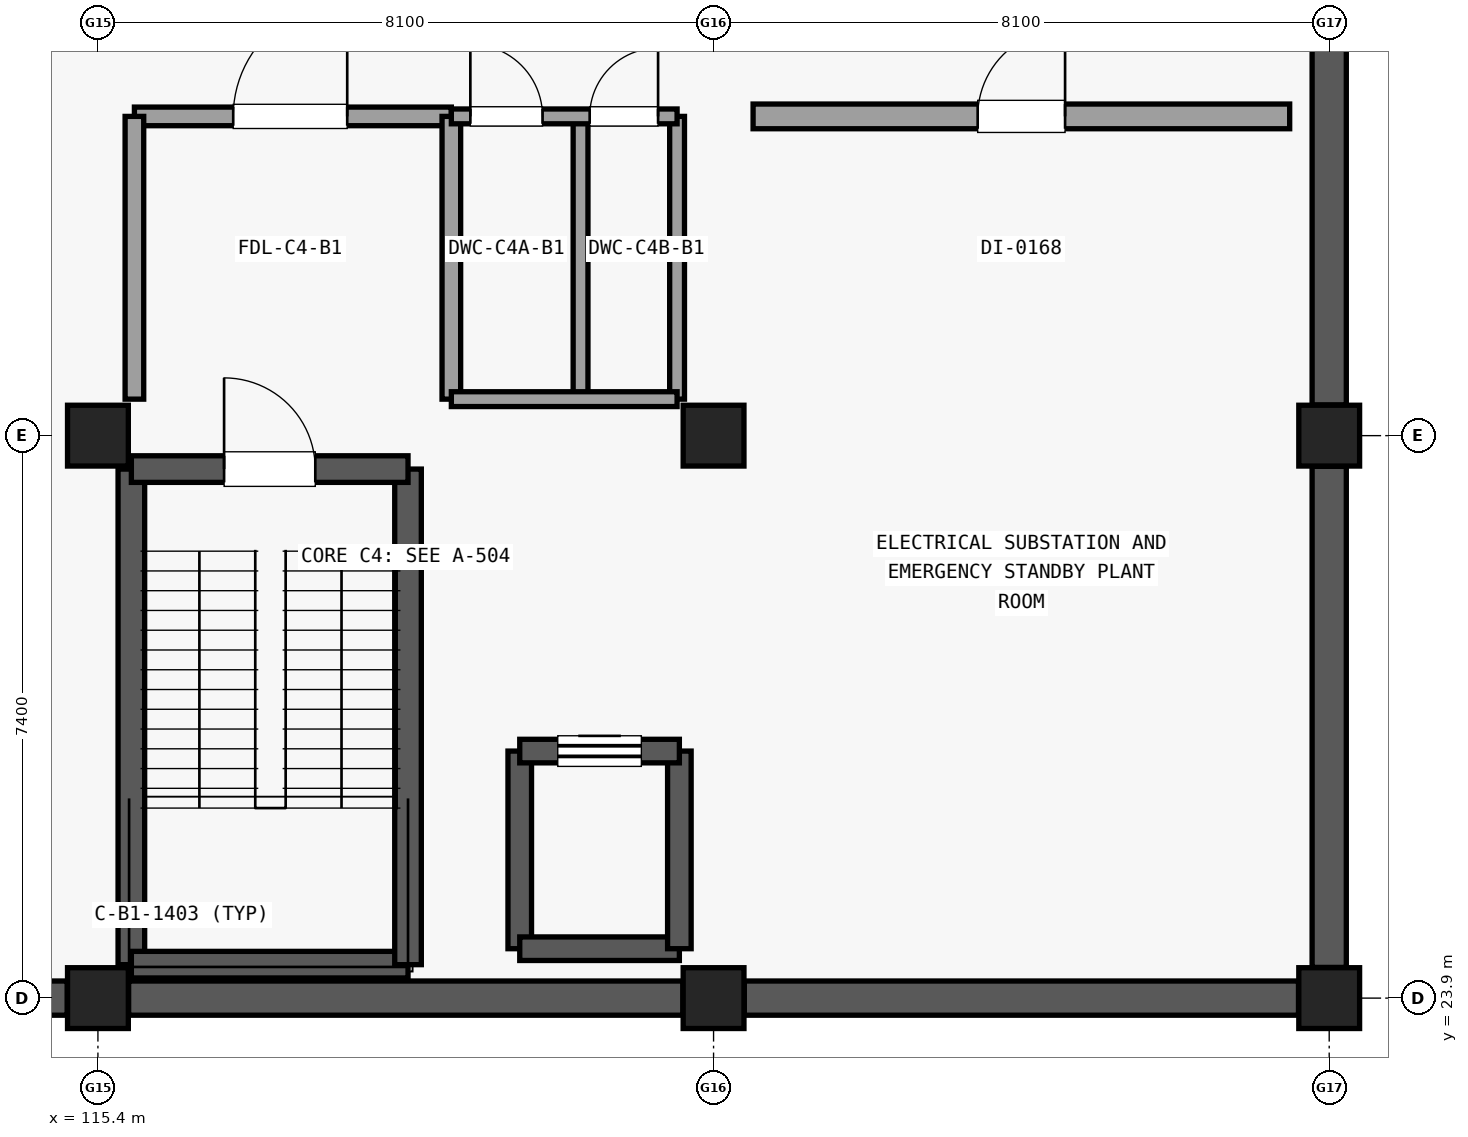
"""IFC4 building model, lengths in metres.
Left out: names, types, materials, properties, quantities, classifications, styles, units other than length and angle.
Written with IfcOpenShell. Run it as: python <this file> out.ifc"""

import sys

from ifc_helpers import new_model, si_unit, direction, frame, frame_2d, origin, origin_2d, place, context, subcontext, project, spatial, rectangle, extrude, element, fill, save


model = new_model("IFC4")
c1 = context("Model", 3, precision=1e-05, world=origin(), true_north=direction((0.0, 1.0)))
c2 = subcontext(c1, "Body", "Model", "MODEL_VIEW")
j1 = project(units=[si_unit("LENGTHUNIT", "METRE"), si_unit("PLANEANGLEUNIT", "RADIAN")], contexts=[c1])
p1 = place(None, origin())
s1 = spatial("IfcSite", under=j1, at=p1, CompositionType="ELEMENT")
p2 = place(p1, origin())
s2 = spatial("IfcBuilding", under=s1, at=p2, CompositionType="ELEMENT")
p3 = place(p2, frame((0.0, 0.0, -4.8)))
s3 = spatial("IfcBuildingStorey", under=s2, at=p3, CompositionType="ELEMENT", Elevation=-4.8)
for number, where, z_axis, x_axis in (
    (1, (115.4, 23.9, 0.0), (0.0, 0.0, 1.0), (1.0, 0.0, 0.0)),
    (2, (115.4, 31.3, 0.0), (0.0, 0.0, 1.0), (1.0, 0.0, 0.0)),
    (3, (123.5, 23.9, 0.0), (0.0, 0.0, 1.0), (1.0, 0.0, 0.0)),
    (4, (123.5, 31.3, 0.0), (0.0, 0.0, 1.0), (1.0, 0.0, 0.0)),
    (5, (131.6, 23.9, 0.0), (0.0, 0.0, 1.0), (1.0, 0.0, 0.0)),
    (6, (131.6, 31.3, 0.0), (0.0, 0.0, 1.0), (1.0, 0.0, 0.0)),
):
    element("IfcColumn", number, at=place(p3, frame(where, z_axis=z_axis, x_axis=x_axis)), inside=s3, PredefinedType="COLUMN", context=c2, shape_type="SweptSolid", body=[
        extrude(rectangle(XDim=0.8, YDim=0.8, at=origin_2d()), origin(), (0.0, 0.0, 1.0), 4.52),
    ])
for number, where, z_axis, x_axis in (
    (7, (114.996, 23.9, 0.0), (0.0, 0.0, 1.0), (-1.0, 0.0, 0.0)),
    (8, (123.096, 23.9, 0.0), (0.0, 0.0, 1.0), (-1.0, 0.0, 0.0)),
    (9, (131.196, 23.9, 0.0), (0.0, 0.0, 1.0), (-1.0, 0.0, 0.0)),
):
    element("IfcWall", number, at=place(p3, frame(where, z_axis=z_axis, x_axis=x_axis)), inside=s3, PredefinedType="USERDEFINED", context=c2, shape_type="SweptSolid", body=[
        extrude(rectangle(XDim=7.292, YDim=0.45, at=frame_2d((3.646, 0.0))), origin(), (0.0, 0.0, 1.0), 2.95),
    ])
p4 = place(p3, frame((131.6, 30.896, 0.0), z_axis=(0.0, 0.0, 1.0), x_axis=(0.0, -1.0, 0.0)))
e10 = element("IfcWall", 10, at=p4, inside=s3, PredefinedType="USERDEFINED", context=c2, shape_type="SweptSolid", body=[
    extrude(rectangle(XDim=6.592, YDim=0.45, at=frame_2d((3.296, 0.0))), origin(), (0.0, 0.0, 1.0), 2.95),
])
p5 = place(p3, frame((131.6, 38.296, 0.0), z_axis=(0.0, 0.0, 1.0), x_axis=(0.0, -1.0, 0.0)))
e11 = element("IfcWall", 11, at=p5, inside=s3, PredefinedType="USERDEFINED", context=c2, shape_type="SweptSolid", body=[
    extrude(rectangle(XDim=6.592, YDim=0.45, at=frame_2d((3.296, 0.0))), origin(), (0.0, 0.0, 1.0), 2.95),
])
p6 = place(p3, frame((115.84, 24.34, 0.0), z_axis=(0.0, 0.0, 1.0), x_axis=(0.0, 1.0, 0.0)))
e12 = element("IfcWall", 12, at=p6, inside=s3, PredefinedType="SHEAR", context=c2, shape_type="SweptSolid", body=[
    extrude(rectangle(XDim=6.52, YDim=0.35, at=frame_2d((3.26, 0.0))), origin(), (0.0, 0.0, 1.0), 4.515),
])
p7 = place(p3, frame((115.84, 24.34, 0.0), z_axis=(0.0, 0.0, 1.0), x_axis=(1.0, 0.0, 0.0)))
e13 = element("IfcWall", 13, at=p7, inside=s3, PredefinedType="SHEAR", context=c2, shape_type="SweptSolid", body=[
    extrude(rectangle(XDim=3.64, YDim=0.35, at=frame_2d((1.82, 0.0))), origin(), (0.0, 0.0, 1.0), 4.515),
])
p8 = place(p3, frame((119.48, 24.34, 0.0), z_axis=(0.0, 0.0, 1.0), x_axis=(0.0, 1.0, 0.0)))
e14 = element("IfcWall", 14, at=p8, inside=s3, PredefinedType="SHEAR", context=c2, shape_type="SweptSolid", body=[
    extrude(rectangle(XDim=6.52, YDim=0.35, at=frame_2d((3.26, 0.0))), origin(), (0.0, 0.0, 1.0), 4.515),
])
p9 = place(p3, frame((115.84, 30.86, 0.0), z_axis=(0.0, 0.0, 1.0), x_axis=(1.0, 0.0, 0.0)))
e15 = element("IfcWall", 15, at=p9, inside=s3, PredefinedType="SHEAR", context=c2, shape_type="SweptSolid", body=[
    extrude(rectangle(XDim=3.64, YDim=0.35, at=frame_2d((1.82, 0.0))), origin(), (0.0, 0.0, 1.0), 4.515),
])
p10 = place(p9, frame((1.22, 0.0, 0.0)))
e16 = element("IfcOpeningElement", 16, at=p10, cuts=e15, PredefinedType="OPENING", context=c2, shape_type="SweptSolid", body=[
    extrude(rectangle(XDim=1.2, YDim=2.15, at=frame_2d((0.6, 1.075))), frame((0.0, 0.185, 0.0), z_axis=(0.0, -1.0, 0.0), x_axis=(1.0, 0.0, 0.0)), (0.0, 0.0, 1.0), 0.37),
])
p11 = place(p3, frame((120.95, 24.55, 0.0), z_axis=(0.0, 0.0, 1.0), x_axis=(0.0, 1.0, 0.0)))
e17 = element("IfcWall", 17, at=p11, inside=s3, PredefinedType="SHEAR", context=c2, shape_type="SweptSolid", body=[
    extrude(rectangle(XDim=2.6, YDim=0.31, at=frame_2d((1.3, 0.0))), origin(), (0.0, 0.0, 1.0), 4.515),
])
p12 = place(p3, frame((120.95, 24.55, 0.0), z_axis=(0.0, 0.0, 1.0), x_axis=(1.0, 0.0, 0.0)))
e18 = element("IfcWall", 18, at=p12, inside=s3, PredefinedType="SHEAR", context=c2, shape_type="SweptSolid", body=[
    extrude(rectangle(XDim=2.1, YDim=0.31, at=frame_2d((1.05, 0.0))), origin(), (0.0, 0.0, 1.0), 4.515),
])
p13 = place(p3, frame((123.05, 24.55, 0.0), z_axis=(0.0, 0.0, 1.0), x_axis=(0.0, 1.0, 0.0)))
e19 = element("IfcWall", 19, at=p13, inside=s3, PredefinedType="SHEAR", context=c2, shape_type="SweptSolid", body=[
    extrude(rectangle(XDim=2.6, YDim=0.31, at=frame_2d((1.3, 0.0))), origin(), (0.0, 0.0, 1.0), 4.515),
])
p14 = place(p3, frame((120.95, 27.15, 0.0), z_axis=(0.0, 0.0, 1.0), x_axis=(1.0, 0.0, 0.0)))
e20 = element("IfcWall", 20, at=p14, inside=s3, PredefinedType="SHEAR", context=c2, shape_type="SweptSolid", body=[
    extrude(rectangle(XDim=2.1, YDim=0.31, at=frame_2d((1.05, 0.0))), origin(), (0.0, 0.0, 1.0), 4.515),
])
p15 = place(p14, frame((0.5, 0.0, 0.0)))
e21 = element("IfcOpeningElement", 21, at=p15, cuts=e20, PredefinedType="OPENING", context=c2, shape_type="SweptSolid", body=[
    extrude(rectangle(XDim=1.1, YDim=2.15, at=frame_2d((0.55, 1.075))), frame((0.0, 0.165, 0.0), z_axis=(0.0, -1.0, 0.0), x_axis=(1.0, 0.0, 0.0)), (0.0, 0.0, 1.0), 0.33),
])
p16 = place(p3, frame((115.88, 35.5, 0.0), z_axis=(0.0, 0.0, 1.0), x_axis=(1.0, 0.0, 0.0)))
e22 = element("IfcWall", 22, at=p16, inside=s3, PredefinedType="PARTITIONING", context=c2, shape_type="SweptSolid", body=[
    extrude(rectangle(XDim=4.17, YDim=0.245, at=frame_2d((2.085, 0.0))), origin(), (0.0, 0.0, 1.0), 3.71),
])
p17 = place(p16, frame((1.3, 0.0, 0.0)))
e23 = element("IfcOpeningElement", 23, at=p17, cuts=e22, PredefinedType="OPENING", context=c2, shape_type="SweptSolid", body=[
    extrude(rectangle(XDim=1.5, YDim=2.15, at=frame_2d((0.75, 1.075))), frame((0.0, 0.133, 0.0), z_axis=(0.0, -1.0, 0.0), x_axis=(1.0, 0.0, 0.0)), (0.0, 0.0, 1.0), 0.265),
])
for number, where, z_axis, x_axis in (
    (24, (115.88, 31.78, 0.0), (0.0, 0.0, 1.0), (0.0, 1.0, 0.0)),
    (25, (120.05, 31.78, 0.0), (0.0, 0.0, 1.0), (0.0, 1.0, 0.0)),
):
    element("IfcWall", number, at=place(p3, frame(where, z_axis=z_axis, x_axis=x_axis)), inside=s3, PredefinedType="PARTITIONING", context=c2, shape_type="SweptSolid", body=[
        extrude(rectangle(XDim=3.72, YDim=0.245, at=frame_2d((1.86, 0.0))), origin(), (0.0, 0.0, 1.0), 3.66),
    ])
for number, where, z_axis, x_axis in (
    (26, (121.75, 31.78, 0.0), (0.0, 0.0, 1.0), (0.0, 1.0, 0.0)),
    (27, (123.02, 31.78, 0.0), (0.0, 0.0, 1.0), (0.0, 1.0, 0.0)),
):
    element("IfcWall", number, at=place(p3, frame(where, z_axis=z_axis, x_axis=x_axis)), inside=s3, PredefinedType="PARTITIONING", context=c2, shape_type="SweptSolid", body=[
        extrude(rectangle(XDim=3.72, YDim=0.195, at=frame_2d((1.86, 0.0))), origin(), (0.0, 0.0, 1.0), 3.66),
    ])
p18 = place(p3, frame((120.05, 31.78, 0.0), z_axis=(0.0, 0.0, 1.0), x_axis=(1.0, 0.0, 0.0)))
e28 = element("IfcWall", 28, at=p18, inside=s3, PredefinedType="PARTITIONING", context=c2, shape_type="SweptSolid", body=[
    extrude(rectangle(XDim=2.97, YDim=0.195, at=frame_2d((1.485, 0.0))), origin(), (0.0, 0.0, 1.0), 3.66),
])
p19 = place(p3, frame((120.05, 35.5, 0.0), z_axis=(0.0, 0.0, 1.0), x_axis=(1.0, 0.0, 0.0)))
e29 = element("IfcWall", 29, at=p19, inside=s3, PredefinedType="PARTITIONING", context=c2, shape_type="SweptSolid", body=[
    extrude(rectangle(XDim=2.97, YDim=0.195, at=frame_2d((1.485, 0.0))), origin(), (0.0, 0.0, 1.0), 3.71),
])
p20 = place(p19, frame((0.25, 0.0, 0.0)))
e30 = element("IfcOpeningElement", 30, at=p20, cuts=e29, PredefinedType="OPENING", context=c2, shape_type="SweptSolid", body=[
    extrude(rectangle(XDim=0.95, YDim=2.1, at=frame_2d((0.475, 1.05))), frame((0.0, 0.107, 0.0), z_axis=(0.0, -1.0, 0.0), x_axis=(1.0, 0.0, 0.0)), (0.0, 0.0, 1.0), 0.215),
])
p21 = place(p19, frame((1.82, 0.0, 0.0)))
e31 = element("IfcOpeningElement", 31, at=p21, cuts=e29, PredefinedType="OPENING", context=c2, shape_type="SweptSolid", body=[
    extrude(rectangle(XDim=0.9, YDim=2.1, at=frame_2d((0.45, 1.05))), frame((0.0, 0.107, 0.0), z_axis=(0.0, -1.0, 0.0), x_axis=(1.0, 0.0, 0.0)), (0.0, 0.0, 1.0), 0.215),
])
p22 = place(p3, frame((124.02, 35.5, 0.0), z_axis=(0.0, 0.0, 1.0), x_axis=(1.0, 0.0, 0.0)))
e32 = element("IfcWall", 32, at=p22, inside=s3, PredefinedType="SHEAR", context=c2, shape_type="SweptSolid", body=[
    extrude(rectangle(XDim=7.06, YDim=0.325, at=frame_2d((3.53, 0.0))), origin(), (0.0, 0.0, 1.0), 3.71),
])
p23 = place(p22, frame((2.955, 0.0, 0.0)))
e33 = element("IfcOpeningElement", 33, at=p23, cuts=e32, PredefinedType="OPENING", context=c2, shape_type="SweptSolid", body=[
    extrude(rectangle(XDim=1.15, YDim=2.15, at=frame_2d((0.575, 1.075))), frame((0.0, 0.172, 0.0), z_axis=(0.0, -1.0, 0.0), x_axis=(1.0, 0.0, 0.0)), (0.0, 0.0, 1.0), 0.345),
])
p24 = place(p10, origin())
e34 = element("IfcDoor", 34, at=p24, inside=s3, OperationType="SINGLE_SWING_LEFT", PredefinedType="DOOR", context=c2, shape_type="SweptSolid", body=[
    extrude(rectangle(XDim=1.2, YDim=2.15, at=frame_2d((0.6, 1.075))), frame((0.0, 0.025, 0.0), z_axis=(0.0, -1.0, 0.0), x_axis=(1.0, 0.0, 0.0)), (0.0, 0.0, 1.0), 0.05),
])
fill(e16, e34)
p25 = place(p15, origin())
e35 = element("IfcDoor", 35, at=p25, inside=s3, OperationType="SLIDING_TO_LEFT", PredefinedType="DOOR", context=c2, shape_type="SweptSolid", body=[
    extrude(rectangle(XDim=1.1, YDim=2.15, at=frame_2d((0.55, 1.075))), frame((0.0, 0.025, 0.0), z_axis=(0.0, -1.0, 0.0), x_axis=(1.0, 0.0, 0.0)), (0.0, 0.0, 1.0), 0.05),
])
fill(e21, e35)
p26 = place(p17, origin())
e36 = element("IfcDoor", 36, at=p26, inside=s3, OperationType="SINGLE_SWING_RIGHT", PredefinedType="DOOR", context=c2, shape_type="SweptSolid", body=[
    extrude(rectangle(XDim=1.5, YDim=2.15, at=frame_2d((0.75, 1.075))), frame((0.0, 0.025, 0.0), z_axis=(0.0, -1.0, 0.0), x_axis=(1.0, 0.0, 0.0)), (0.0, 0.0, 1.0), 0.05),
])
fill(e23, e36)
p27 = place(p20, origin())
e37 = element("IfcDoor", 37, at=p27, inside=s3, OperationType="SINGLE_SWING_LEFT", PredefinedType="DOOR", context=c2, shape_type="SweptSolid", body=[
    extrude(rectangle(XDim=0.95, YDim=2.1, at=frame_2d((0.475, 1.05))), frame((0.0, 0.025, 0.0), z_axis=(0.0, -1.0, 0.0), x_axis=(1.0, 0.0, 0.0)), (0.0, 0.0, 1.0), 0.05),
])
fill(e30, e37)
p28 = place(p21, origin())
e38 = element("IfcDoor", 38, at=p28, inside=s3, OperationType="SINGLE_SWING_RIGHT", PredefinedType="DOOR", context=c2, shape_type="SweptSolid", body=[
    extrude(rectangle(XDim=0.9, YDim=2.1, at=frame_2d((0.45, 1.05))), frame((0.0, 0.025, 0.0), z_axis=(0.0, -1.0, 0.0), x_axis=(1.0, 0.0, 0.0)), (0.0, 0.0, 1.0), 0.05),
])
fill(e31, e38)
p29 = place(p23, origin())
e39 = element("IfcDoor", 39, at=p29, inside=s3, OperationType="SINGLE_SWING_RIGHT", PredefinedType="DOOR", context=c2, shape_type="SweptSolid", body=[
    extrude(rectangle(XDim=1.15, YDim=2.15, at=frame_2d((0.575, 1.075))), frame((0.0, 0.025, 0.0), z_axis=(0.0, -1.0, 0.0), x_axis=(1.0, 0.0, 0.0)), (0.0, 0.0, 1.0), 0.05),
])
fill(e33, e39)
save(model, sys.argv[1])
